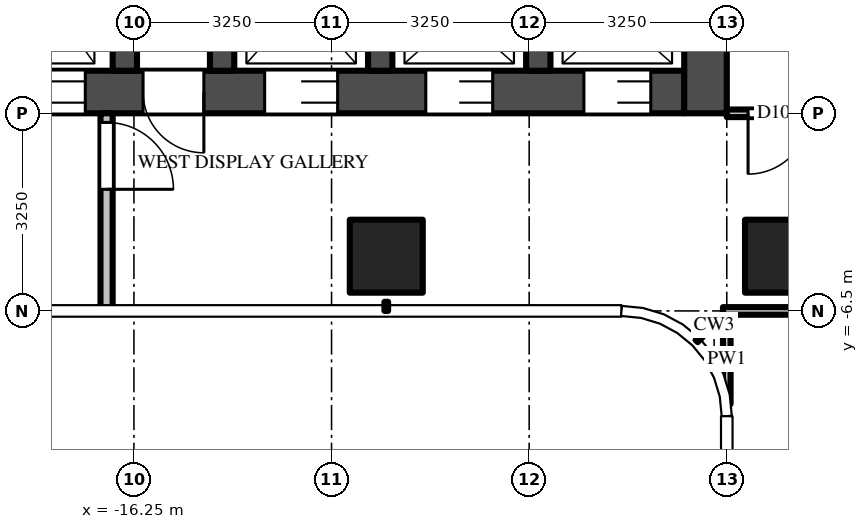
"""IFC4 building model, lengths in metres.
Left out: names, types, materials, properties, quantities, classifications, styles, units other than length and angle.
Written with IfcOpenShell. Run it as: python <this file> out.ifc"""

import sys

from ifc_helpers import new_model, si_unit, direction, frame, frame_2d, origin, origin_2d, place, context, subcontext, project, spatial, rectangle, extrude, source, transform, mapped, element, fill, save


model = new_model("IFC4")
c1 = context("Model", 3, precision=1e-05, world=origin(), true_north=direction((0.0, 1.0)))
c2 = subcontext(c1, "Body", "Model", "MODEL_VIEW")
j1 = project(units=[si_unit("LENGTHUNIT", "METRE"), si_unit("PLANEANGLEUNIT", "RADIAN")], contexts=[c1])
p1 = place(None, origin())
s1 = spatial("IfcSite", under=j1, at=p1, CompositionType="ELEMENT")
p2 = place(p1, origin())
s2 = spatial("IfcBuilding", under=s1, at=p2, CompositionType="ELEMENT")
p3 = place(p2, frame((0.0, 0.0, 177.6)))
s3 = spatial("IfcBuildingStorey", under=s2, at=p3, CompositionType="ELEMENT", Elevation=177.6)
m1 = source(origin(), c2, "Body", "SweptSolid", [
    extrude(rectangle(XDim=1.2, YDim=1.2, at=origin_2d()), origin(), (0.0, 0.0, 1.0), 3.9),
])
for number, where, z_axis, x_axis in (
    (1, (-5.6, -5.6, 0.0), (0.0, 0.0, 1.0), (1.0, 0.0, 0.0)),
    (2, (-12.1, -5.6, 0.0), (0.0, 0.0, 1.0), (1.0, 0.0, 0.0)),
):
    element("IfcColumn", number, at=place(p3, frame(where, z_axis=z_axis, x_axis=x_axis)), inside=s3, PredefinedType="COLUMN", context=c2, shape_type="MappedRepresentation", body=[
        mapped(m1, transform((0.0, 0.0, 0.0))),
    ])
m2 = source(origin(), c2, "Body", "SweptSolid", [
    extrude(rectangle(XDim=14.85, YDim=0.7, at=frame_2d((7.425, 0.0))), origin(), (0.0, 0.0, 1.0), 3.7),
])
p4 = place(p3, frame((-7.2, -2.9, 0.0), z_axis=(0.0, 0.0, 1.0), x_axis=(-1.0, 0.0, 0.0)))
e3 = element("IfcWall", 3, at=p4, inside=s3, PredefinedType="SHEAR", context=c2, shape_type="MappedRepresentation", body=[
    mapped(m2, transform((0.0, 0.0, 0.0))),
])
m3 = source(origin(), c2, "Body", "SweptSolid", [
    extrude(rectangle(XDim=1.1, YDim=2.1, at=frame_2d((0.55, 1.05))), frame((0.0, 0.36, 0.0), z_axis=(0.0, -1.0, 0.0), x_axis=(1.0, 0.0, 0.0)), (0.0, 0.0, 1.0), 0.72),
])
p5 = place(p4, frame((0.55, 0.0, 0.0)))
e4 = element("IfcOpeningElement", 4, at=p5, cuts=e3, PredefinedType="OPENING", context=c2, shape_type="MappedRepresentation", body=[
    mapped(m3, transform((0.0, 0.0, 0.0))),
])
p6 = place(p4, frame((3.15, 0.0, 0.0)))
e5 = element("IfcOpeningElement", 5, at=p6, cuts=e3, PredefinedType="OPENING", context=c2, shape_type="MappedRepresentation", body=[
    mapped(m3, transform((0.0, 0.0, 0.0))),
])
m4 = source(origin(), c2, "Body", "SweptSolid", [
    extrude(rectangle(XDim=1.2, YDim=2.1, at=frame_2d((0.6, 1.05))), frame((0.0, 0.36, 0.0), z_axis=(0.0, -1.0, 0.0), x_axis=(1.0, 0.0, 0.0)), (0.0, 0.0, 1.0), 0.72),
])
p7 = place(p4, frame((5.7, 0.0, 0.0)))
e6 = element("IfcOpeningElement", 6, at=p7, cuts=e3, PredefinedType="OPENING", context=c2, shape_type="MappedRepresentation", body=[
    mapped(m4, transform((0.0, 0.0, 0.0))),
])
m5 = source(origin(), c2, "Body", "SweptSolid", [
    extrude(rectangle(XDim=1.3, YDim=2.1, at=frame_2d((0.65, 1.05))), frame((0.0, 0.36, 0.0), z_axis=(0.0, -1.0, 0.0), x_axis=(1.0, 0.0, 0.0)), (0.0, 0.0, 1.0), 0.72),
])
p8 = place(p4, frame((12.2, 0.0, 0.0)))
e7 = element("IfcOpeningElement", 7, at=p8, cuts=e3, PredefinedType="OPENING", context=c2, shape_type="MappedRepresentation", body=[
    mapped(m5, transform((0.0, 0.0, 0.0))),
])
p9 = place(p4, frame((9.85, 0.0, 0.0)))
e8 = element("IfcOpeningElement", 8, at=p9, cuts=e3, PredefinedType="OPENING", context=c2, shape_type="MappedRepresentation", body=[
    mapped(m4, transform((0.0, 0.0, 0.0))),
])
m6 = source(origin(), c2, "Body", "SweptSolid", [
    extrude(rectangle(XDim=1.0, YDim=2.1, at=frame_2d((0.5, 1.05))), frame((0.0, 0.36, 0.0), z_axis=(0.0, -1.0, 0.0), x_axis=(1.0, 0.0, 0.0)), (0.0, 0.0, 1.0), 0.72),
])
p10 = place(p4, frame((7.9, 0.0, 0.0)))
e9 = element("IfcOpeningElement", 9, at=p10, cuts=e3, PredefinedType="OPENING", context=c2, shape_type="MappedRepresentation", body=[
    mapped(m6, transform((0.0, 0.0, 0.0))),
])
m7 = source(origin(), c2, "Body", "SweptSolid", [
    extrude(rectangle(XDim=9.05, YDim=0.7, at=frame_2d((4.525, 0.0))), origin(), (0.0, 0.0, 1.0), 3.7),
])
p11 = place(p3, frame((-6.85, 5.8, 0.0), z_axis=(0.0, 0.0, 1.0), x_axis=(0.0, -1.0, 0.0)))
e10 = element("IfcWall", 10, at=p11, inside=s3, PredefinedType="SHEAR", context=c2, shape_type="MappedRepresentation", body=[
    mapped(m7, transform((0.0, 0.0, 0.0))),
])
m8 = source(origin(), c2, "Body", "SweptSolid", [
    extrude(rectangle(XDim=1.8, YDim=2.1, at=frame_2d((0.9, 1.05))), frame((0.0, 0.36, 0.0), z_axis=(0.0, -1.0, 0.0), x_axis=(1.0, 0.0, 0.0)), (0.0, 0.0, 1.0), 0.72),
])
p12 = place(p11, frame((3.15, 0.0, 0.0)))
e11 = element("IfcOpeningElement", 11, at=p12, cuts=e10, PredefinedType="OPENING", context=c2, shape_type="MappedRepresentation", body=[
    mapped(m8, transform((0.0, 0.0, 0.0))),
])
m9 = source(origin(), c2, "Body", "SweptSolid", [
    extrude(rectangle(XDim=2.45, YDim=0.4, at=frame_2d((1.225, 0.0))), origin(), (0.0, 0.0, 1.0), 3.7),
])
for number, where, z_axis, x_axis in (
    (12, (-9.6, -0.1, 0.0), (0.0, 0.0, 1.0), (0.0, -1.0, 0.0)),
    (13, (-12.2, -0.1, 0.0), (0.0, 0.0, 1.0), (0.0, -1.0, 0.0)),
    (14, (-14.8, -0.1, 0.0), (0.0, 0.0, 1.0), (0.0, -1.0, 0.0)),
    (15, (-16.4, -0.1, 0.0), (0.0, 0.0, 1.0), (0.0, -1.0, 0.0)),
):
    element("IfcWall", number, at=place(p3, frame(where, z_axis=z_axis, x_axis=x_axis)), inside=s3, PredefinedType="SHEAR", context=c2, shape_type="MappedRepresentation", body=[
        mapped(m9, transform((0.0, 0.0, 0.0))),
    ])
m10 = source(origin(), c2, "Body", "SweptSolid", [
    extrude(rectangle(XDim=3.25, YDim=0.2, at=frame_2d((1.625, 0.0))), origin(), (0.0, 0.0, 1.0), 3.7),
])
p13 = place(p3, frame((-16.7, -3.25, 0.0), z_axis=(0.0, 0.0, 1.0), x_axis=(0.0, -1.0, 0.0)))
e16 = element("IfcWall", 16, at=p13, inside=s3, PredefinedType="PARTITIONING", context=c2, shape_type="MappedRepresentation", body=[
    mapped(m10, transform((0.0, 0.0, 0.0))),
])
m11 = source(origin(), c2, "Body", "SweptSolid", [
    extrude(rectangle(XDim=1.1, YDim=2.1, at=frame_2d((0.55, 1.05))), frame((0.0, 0.11, 0.0), z_axis=(0.0, -1.0, 0.0), x_axis=(1.0, 0.0, 0.0)), (0.0, 0.0, 1.0), 0.22),
])
p14 = place(p13, frame((0.15, 0.0, 0.0)))
e17 = element("IfcOpeningElement", 17, at=p14, cuts=e16, PredefinedType="OPENING", context=c2, shape_type="MappedRepresentation", body=[
    mapped(m11, transform((0.0, 0.0, 0.0))),
])
m12 = source(origin(), c2, "Body", "SweptSolid", [
    extrude(rectangle(XDim=1.469, YDim=0.125, at=frame_2d((0.734, 0.0))), origin(), (0.0, 0.0, 1.0), 3.7),
])
p15 = place(p3, frame((-6.5, -6.562, 0.0), z_axis=(0.0, 0.0, 1.0), x_axis=(0.0, -1.0, 0.0)))
e18 = element("IfcWall", 18, at=p15, inside=s3, PredefinedType="PARTITIONING", context=c2, shape_type="MappedRepresentation", body=[
    mapped(m12, transform((0.0, 0.0, 0.0))),
])
m13 = source(origin(), c2, "Body", "SweptSolid", [
    extrude(rectangle(XDim=5.425, YDim=0.125, at=frame_2d((2.712, 0.0))), origin(), (0.0, 0.0, 1.0), 2.78),
])
p16 = place(p3, frame((-1.137, -6.5, 0.0), z_axis=(0.0, 0.0, 1.0), x_axis=(-1.0, 0.0, 0.0)))
e19 = element("IfcWall", 19, at=p16, inside=s3, PredefinedType="PARTITIONING", context=c2, shape_type="MappedRepresentation", body=[
    mapped(m13, transform((0.0, 0.0, 0.0))),
])
m14 = source(origin(), c2, "Body", "SweptSolid", [
    extrude(rectangle(XDim=1.0, YDim=2.1, at=frame_2d((0.5, 1.05))), frame((0.0, 0.073, 0.0), z_axis=(0.0, -1.0, 0.0), x_axis=(1.0, 0.0, 0.0)), (0.0, 0.0, 1.0), 0.145),
])
p17 = place(p16, frame((2.812, 0.0, 0.0)))
e20 = element("IfcOpeningElement", 20, at=p17, cuts=e19, PredefinedType="OPENING", context=c2, shape_type="MappedRepresentation", body=[
    mapped(m14, transform((0.0, 0.0, 0.0))),
])
m15 = source(origin(), c2, "Body", "SweptSolid", [
    extrude(rectangle(XDim=5.363, YDim=0.125, at=frame_2d((2.681, 0.0))), origin(), (0.0, 0.0, 1.0), 2.997),
])
p18 = place(p3, frame((-1.137, -3.25, 0.0), z_axis=(0.0, 0.0, 1.0), x_axis=(-1.0, 0.0, 0.0)))
e21 = element("IfcWall", 21, at=p18, inside=s3, PredefinedType="PARTITIONING", context=c2, shape_type="MappedRepresentation", body=[
    mapped(m15, transform((0.0, 0.0, 0.0))),
])
p19 = place(p18, frame((4.012, 0.0, 0.0)))
e22 = element("IfcOpeningElement", 22, at=p19, cuts=e21, PredefinedType="OPENING", context=c2, shape_type="MappedRepresentation", body=[
    mapped(m14, transform((0.0, 0.0, 0.0))),
])
m16 = source(origin(), c2, "Body", "SweptSolid", [
    extrude(rectangle(XDim=1.1, YDim=2.1, at=frame_2d((0.55, 1.05))), frame((0.0, -0.275, 0.0), z_axis=(0.0, -1.0, 0.0), x_axis=(1.0, 0.0, 0.0)), (0.0, 0.0, 1.0), 0.05),
])
p20 = place(p5, origin())
e23 = element("IfcDoor", 23, at=p20, inside=s3, OperationType="DOUBLE_DOOR_SLIDING", PredefinedType="DOOR", context=c2, shape_type="MappedRepresentation", body=[
    mapped(m16, transform((0.0, 0.0, 0.0))),
])
fill(e4, e23)
p21 = place(p6, origin())
e24 = element("IfcDoor", 24, at=p21, inside=s3, OperationType="DOUBLE_DOOR_SLIDING", PredefinedType="DOOR", context=c2, shape_type="MappedRepresentation", body=[
    mapped(m16, transform((0.0, 0.0, 0.0))),
])
fill(e5, e24)
m17 = source(origin(), c2, "Body", "SweptSolid", [
    extrude(rectangle(XDim=1.2, YDim=2.1, at=frame_2d((0.6, 1.05))), frame((0.0, -0.275, 0.0), z_axis=(0.0, -1.0, 0.0), x_axis=(1.0, 0.0, 0.0)), (0.0, 0.0, 1.0), 0.05),
])
p22 = place(p7, origin())
e25 = element("IfcDoor", 25, at=p22, inside=s3, OperationType="DOUBLE_DOOR_SLIDING", PredefinedType="DOOR", context=c2, shape_type="MappedRepresentation", body=[
    mapped(m17, transform((0.0, 0.0, 0.0))),
])
fill(e6, e25)
p23 = place(p9, origin())
e26 = element("IfcDoor", 26, at=p23, inside=s3, OperationType="DOUBLE_DOOR_SLIDING", PredefinedType="DOOR", context=c2, shape_type="MappedRepresentation", body=[
    mapped(m17, transform((0.0, 0.0, 0.0))),
])
fill(e8, e26)
m18 = source(origin(), c2, "Body", "SweptSolid", [
    extrude(rectangle(XDim=1.0, YDim=2.1, at=frame_2d((0.5, 1.05))), frame((0.0, -0.275, 0.0), z_axis=(0.0, -1.0, 0.0), x_axis=(1.0, 0.0, 0.0)), (0.0, 0.0, 1.0), 0.05),
])
p24 = place(p10, origin())
e27 = element("IfcDoor", 27, at=p24, inside=s3, OperationType="SINGLE_SWING_LEFT", PredefinedType="DOOR", context=c2, shape_type="MappedRepresentation", body=[
    mapped(m18, transform((0.0, 0.0, 0.0))),
])
fill(e9, e27)
m19 = source(origin(), c2, "Body", "SweptSolid", [
    extrude(rectangle(XDim=1.1, YDim=2.1, at=frame_2d((0.55, 1.05))), frame((0.0, 0.025, 0.0), z_axis=(0.0, -1.0, 0.0), x_axis=(1.0, 0.0, 0.0)), (0.0, 0.0, 1.0), 0.05),
])
p25 = place(p14, origin())
e28 = element("IfcDoor", 28, at=p25, inside=s3, OperationType="SINGLE_SWING_RIGHT", PredefinedType="DOOR", context=c2, shape_type="MappedRepresentation", body=[
    mapped(m19, transform((0.0, 0.0, 0.0))),
])
fill(e17, e28)
m20 = source(origin(), c2, "Body", "SweptSolid", [
    extrude(rectangle(XDim=1.0, YDim=2.1, at=frame_2d((0.5, 1.05))), frame((0.0, 0.025, 0.0), z_axis=(0.0, -1.0, 0.0), x_axis=(1.0, 0.0, 0.0)), (0.0, 0.0, 1.0), 0.05),
])
p26 = place(p19, origin())
e29 = element("IfcDoor", 29, at=p26, inside=s3, OperationType="SINGLE_SWING_RIGHT", PredefinedType="DOOR", context=c2, shape_type="MappedRepresentation", body=[
    mapped(m20, transform((0.0, 0.0, 0.0))),
])
fill(e22, e29)
save(model, sys.argv[1])
